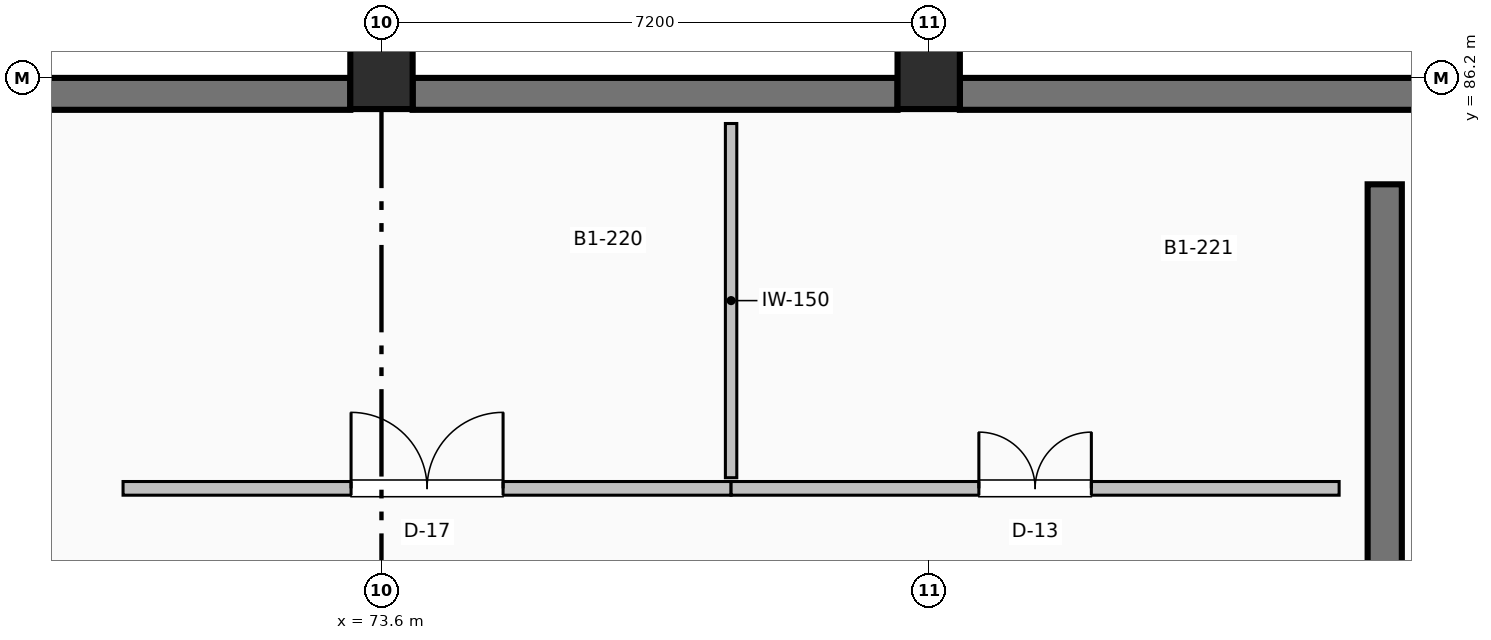
"""IFC4 building model, lengths in metres.
Left out: names, types, materials, properties, quantities, classifications, styles, units other than length and angle.
Written with IfcOpenShell. Run it as: python <this file> out.ifc"""

import sys

from ifc_helpers import new_model, si_unit, direction, frame, frame_2d, origin, origin_2d, place, context, subcontext, project, spatial, rectangle, extrude, element, fill, save


model = new_model("IFC4")
c1 = context("Model", 3, precision=1e-05, world=origin(), true_north=direction((0.0, 1.0)))
c2 = subcontext(c1, "Body", "Model", "MODEL_VIEW")
j1 = project(units=[si_unit("LENGTHUNIT", "METRE"), si_unit("PLANEANGLEUNIT", "RADIAN")], contexts=[c1])
p1 = place(None, origin())
s1 = spatial("IfcSite", under=j1, at=p1, CompositionType="ELEMENT")
p2 = place(p1, origin())
s2 = spatial("IfcBuilding", under=s1, at=p2, CompositionType="ELEMENT")
p3 = place(p2, frame((0.0, 0.0, -4.8)))
s3 = spatial("IfcBuildingStorey", under=s2, at=p3, CompositionType="ELEMENT", Elevation=-4.8)
for number, where, z_axis, x_axis in (
    (1, (73.6, 86.2, 0.0), (0.0, 0.0, 1.0), (1.0, 0.0, 0.0)),
    (2, (80.8, 86.2, 0.0), (0.0, 0.0, 1.0), (1.0, 0.0, 0.0)),
):
    element("IfcColumn", number, at=place(p3, frame(where, z_axis=z_axis, x_axis=x_axis)), inside=s3, PredefinedType="COLUMN", context=c2, shape_type="SweptSolid", body=[
        extrude(rectangle(XDim=0.82, YDim=0.82, at=origin_2d()), origin(), (0.0, 0.0, 1.0), 4.8),
    ])
p4 = place(p3, frame((86.8, 70.8, 0.0), z_axis=(0.0, 0.0, 1.0), x_axis=(0.0, 1.0, 0.0)))
e3 = element("IfcWall", 3, at=p4, inside=s3, PredefinedType="SHEAR", context=c2, shape_type="SweptSolid", body=[
    extrude(rectangle(XDim=14.0, YDim=0.45, at=frame_2d((7.0, 0.0))), origin(), (0.0, 0.0, 1.0), 4.48),
])
for number, where, z_axis, x_axis in (
    (4, (66.81, 85.99, 0.0), (0.0, 0.0, 1.0), (1.0, 0.0, 0.0)),
    (5, (74.01, 85.99, 0.0), (0.0, 0.0, 1.0), (1.0, 0.0, 0.0)),
):
    element("IfcWall", number, at=place(p3, frame(where, z_axis=z_axis, x_axis=x_axis)), inside=s3, PredefinedType="SHEAR", context=c2, shape_type="SweptSolid", body=[
        extrude(rectangle(XDim=6.38, YDim=0.42, at=frame_2d((3.19, 0.0))), origin(), (0.0, 0.0, 1.0), 4.5),
    ])
p5 = place(p3, frame((81.21, 85.99, 0.0), z_axis=(0.0, 0.0, 1.0), x_axis=(1.0, 0.0, 0.0)))
e6 = element("IfcWall", 6, at=p5, inside=s3, PredefinedType="SHEAR", context=c2, shape_type="SweptSolid", body=[
    extrude(rectangle(XDim=6.38, YDim=0.42, at=frame_2d((3.19, 0.0))), origin(), (0.0, 0.0, 1.0), 4.5),
])
p6 = place(p3, frame((70.2, 80.8, 0.0), z_axis=(0.0, 0.0, 1.0), x_axis=(1.0, 0.0, 0.0)))
e7 = element("IfcWall", 7, at=p6, inside=s3, PredefinedType="PARTITIONING", context=c2, shape_type="SweptSolid", body=[
    extrude(rectangle(XDim=8.0, YDim=0.18, at=frame_2d((4.0, 0.0))), origin(), (0.0, 0.0, 1.0), 4.472),
])
p7 = place(p6, frame((3.0, 0.0, 0.0)))
e8 = element("IfcOpeningElement", 8, at=p7, cuts=e7, PredefinedType="OPENING", context=c2, shape_type="SweptSolid", body=[
    extrude(rectangle(XDim=2.0, YDim=2.28, at=frame_2d((1.0, 1.14))), frame((0.0, 0.1, 0.0), z_axis=(0.0, -1.0, 0.0), x_axis=(1.0, 0.0, 0.0)), (0.0, 0.0, 1.0), 0.2),
])
p8 = place(p3, frame((78.2, 80.94, 0.0), z_axis=(0.0, 0.0, 1.0), x_axis=(0.0, 1.0, 0.0)))
e9 = element("IfcWall", 9, at=p8, inside=s3, PredefinedType="PARTITIONING", context=c2, shape_type="SweptSolid", body=[
    extrude(rectangle(XDim=4.66, YDim=0.15, at=frame_2d((2.33, 0.0))), origin(), (0.0, 0.0, 1.0), 4.472),
])
p9 = place(p3, frame((78.2, 80.8, 0.0), z_axis=(0.0, 0.0, 1.0), x_axis=(1.0, 0.0, 0.0)))
e10 = element("IfcWall", 10, at=p9, inside=s3, PredefinedType="PARTITIONING", context=c2, shape_type="SweptSolid", body=[
    extrude(rectangle(XDim=8.0, YDim=0.18, at=frame_2d((4.0, 0.0))), origin(), (0.0, 0.0, 1.0), 4.472),
])
p10 = place(p9, frame((3.26, 0.0, 0.0)))
e11 = element("IfcOpeningElement", 11, at=p10, cuts=e10, PredefinedType="OPENING", context=c2, shape_type="SweptSolid", body=[
    extrude(rectangle(XDim=1.48, YDim=2.18, at=frame_2d((0.74, 1.09))), frame((0.0, 0.1, 0.0), z_axis=(0.0, -1.0, 0.0), x_axis=(1.0, 0.0, 0.0)), (0.0, 0.0, 1.0), 0.2),
])
p11 = place(p7, origin())
e12 = element("IfcDoor", 12, at=p11, inside=s3, OperationType="DOUBLE_DOOR_SINGLE_SWING", PredefinedType="DOOR", context=c2, shape_type="SweptSolid", body=[
    extrude(rectangle(XDim=2.0, YDim=2.28, at=frame_2d((1.0, 1.14))), frame((0.0, 0.025, 0.0), z_axis=(0.0, -1.0, 0.0), x_axis=(1.0, 0.0, 0.0)), (0.0, 0.0, 1.0), 0.05),
])
fill(e8, e12)
p12 = place(p10, origin())
e13 = element("IfcDoor", 13, at=p12, inside=s3, OperationType="DOUBLE_DOOR_SINGLE_SWING", PredefinedType="DOOR", context=c2, shape_type="SweptSolid", body=[
    extrude(rectangle(XDim=1.48, YDim=2.18, at=frame_2d((0.74, 1.09))), frame((0.0, 0.025, 0.0), z_axis=(0.0, -1.0, 0.0), x_axis=(1.0, 0.0, 0.0)), (0.0, 0.0, 1.0), 0.05),
])
fill(e11, e13)
save(model, sys.argv[1])
